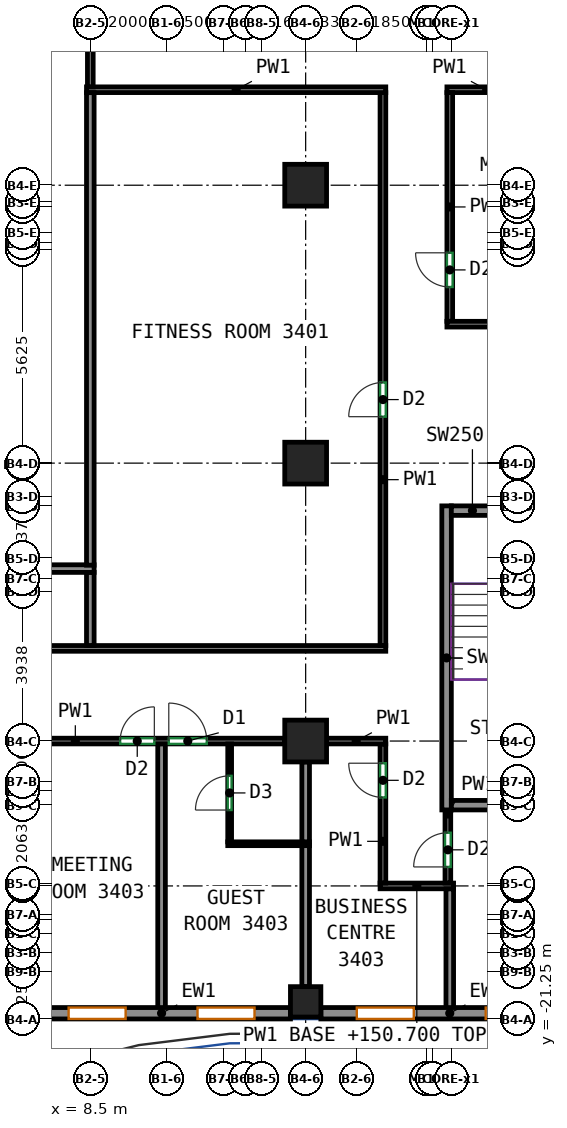
"""IFC4 building model, lengths in metres.
Left out: names, types, materials, properties, quantities, classifications, styles, units other than length and angle.
Written with IfcOpenShell. Run it as: python <this file> out.ifc"""

import sys

from ifc_helpers import new_model, si_unit, direction, frame, frame_2d, origin, origin_2d, place, context, subcontext, project, spatial, rectangle, extrude, source, transform, mapped, element, fill, save


model = new_model("IFC4")
c1 = context("Model", 3, precision=1e-05, world=origin(), true_north=direction((0.0, 1.0)))
c2 = subcontext(c1, "Body", "Model", "MODEL_VIEW")
j1 = project(units=[si_unit("LENGTHUNIT", "METRE"), si_unit("PLANEANGLEUNIT", "RADIAN")], contexts=[c1])
p1 = place(None, origin())
s1 = spatial("IfcSite", under=j1, at=p1, CompositionType="ELEMENT")
p2 = place(p1, origin())
s2 = spatial("IfcBuilding", under=s1, at=p2, CompositionType="ELEMENT")
p3 = place(p2, frame((0.0, 0.0, 150.7)))
s3 = spatial("IfcBuildingStorey", under=s2, at=p3, CompositionType="ELEMENT", Elevation=150.7)
m1 = source(origin(), c2, "Body", "SweptSolid", [
    extrude(rectangle(XDim=0.8, YDim=0.8, at=origin_2d()), origin(), (0.0, 0.0, 1.0), 3.12),
])
p4 = place(p3, frame((14.167, -20.8, 0.0), z_axis=(0.0, 0.0, 1.0), x_axis=(1.0, 0.0, 0.0)))
e1 = element("IfcColumn", 1, at=p4, inside=s3, PredefinedType="COLUMN", context=c2, shape_type="MappedRepresentation", body=[
    mapped(m1, transform((0.0, 0.0, 0.0))),
])
m2 = source(origin(), c2, "Body", "SweptSolid", [
    extrude(rectangle(XDim=1.1, YDim=1.1, at=origin_2d()), origin(), (0.0, 0.0, 1.0), 3.12),
])
for number, where, z_axis, x_axis in (
    (2, (14.167, -13.938, 0.0), (0.0, 0.0, 1.0), (1.0, 0.0, 0.0)),
    (3, (14.167, -6.625, 0.0), (0.0, 0.0, 1.0), (1.0, 0.0, 0.0)),
    (4, (14.167, 0.688, 0.0), (0.0, 0.0, 1.0), (1.0, 0.0, 0.0)),
):
    element("IfcColumn", number, at=place(p3, frame(where, z_axis=z_axis, x_axis=x_axis)), inside=s3, PredefinedType="COLUMN", context=c2, shape_type="MappedRepresentation", body=[
        mapped(m2, transform((0.0, 0.0, 0.0))),
    ])
m3 = source(origin(), c2, "Body", "SweptSolid", [
    extrude(rectangle(XDim=8.0, YDim=0.25, at=frame_2d((4.0, 0.0))), origin(), (0.0, 0.0, 1.0), 3.12),
])
p5 = place(p3, frame((17.875, -15.75, 0.0), z_axis=(0.0, 0.0, 1.0), x_axis=(0.0, 1.0, 0.0)))
e5 = element("IfcWall", 5, at=p5, inside=s3, PredefinedType="SHEAR", context=c2, shape_type="MappedRepresentation", body=[
    mapped(m3, transform((0.0, 0.0, 0.0))),
])
m4 = source(origin(), c2, "Body", "SweptSolid", [
    extrude(rectangle(XDim=3.7, YDim=0.25, at=frame_2d((1.85, 0.0))), origin(), (0.0, 0.0, 1.0), 3.12),
])
p6 = place(p3, frame((18.0, -15.625, 0.0), z_axis=(0.0, 0.0, 1.0), x_axis=(1.0, 0.0, 0.0)))
e6 = element("IfcWall", 6, at=p6, inside=s3, PredefinedType="SHEAR", context=c2, shape_type="MappedRepresentation", body=[
    mapped(m4, transform((0.0, 0.0, 0.0))),
])
p7 = place(p3, frame((18.0, -7.875, 0.0), z_axis=(0.0, 0.0, 1.0), x_axis=(1.0, 0.0, 0.0)))
e7 = element("IfcWall", 7, at=p7, inside=s3, PredefinedType="SHEAR", context=c2, shape_type="MappedRepresentation", body=[
    mapped(m4, transform((0.0, 0.0, 0.0))),
])
p8 = place(p7, frame((1.25, 0.0, 0.0)))
e8 = element("IfcOpeningElement", 8, at=p8, cuts=e7, PredefinedType="OPENING", context=c2, shape_type="SweptSolid", body=[
    extrude(rectangle(XDim=1.2, YDim=2.1, at=frame_2d((0.6, 1.05))), frame((0.0, 0.135, 0.0), z_axis=(0.0, -1.0, 0.0), x_axis=(1.0, 0.0, 0.0)), (0.0, 0.0, 1.0), 0.27),
])
m5 = source(origin(), c2, "Body", "SweptSolid", [
    extrude(rectangle(XDim=6.783, YDim=0.3, at=frame_2d((3.392, 0.0))), origin(), (0.0, 0.0, 1.0), 3.12),
])
p9 = place(p3, frame((6.983, -21.1, 0.0), z_axis=(0.0, 0.0, 1.0), x_axis=(1.0, 0.0, 0.0)))
e9 = element("IfcWall", 9, at=p9, inside=s3, PredefinedType="SOLIDWALL", context=c2, shape_type="MappedRepresentation", body=[
    mapped(m5, transform((0.0, 0.0, 0.0))),
])
p10 = place(p9, frame((0.946, 0.0, 0.85)))
e10 = element("IfcOpeningElement", 10, at=p10, cuts=e9, PredefinedType="OPENING", context=c2, shape_type="SweptSolid", body=[
    extrude(rectangle(XDim=1.5, YDim=1.95, at=frame_2d((0.75, 0.975))), frame((0.0, 0.16, 0.0), z_axis=(0.0, -1.0, 0.0), x_axis=(1.0, 0.0, 0.0)), (0.0, 0.0, 1.0), 0.32),
])
p11 = place(p9, frame((4.338, 0.0, 0.85)))
e11 = element("IfcOpeningElement", 11, at=p11, cuts=e9, PredefinedType="OPENING", context=c2, shape_type="SweptSolid", body=[
    extrude(rectangle(XDim=1.5, YDim=1.95, at=frame_2d((0.75, 0.975))), frame((0.0, 0.16, 0.0), z_axis=(0.0, -1.0, 0.0), x_axis=(1.0, 0.0, 0.0)), (0.0, 0.0, 1.0), 0.32),
])
m6 = source(origin(), c2, "Body", "SweptSolid", [
    extrude(rectangle(XDim=6.783, YDim=0.3, at=frame_2d((3.392, 0.0))), origin(), (0.0, 0.0, 1.0), 3.12),
])
p12 = place(p3, frame((14.567, -21.1, 0.0), z_axis=(0.0, 0.0, 1.0), x_axis=(1.0, 0.0, 0.0)))
e12 = element("IfcWall", 12, at=p12, inside=s3, PredefinedType="SOLIDWALL", context=c2, shape_type="MappedRepresentation", body=[
    mapped(m6, transform((0.0, 0.0, 0.0))),
])
p13 = place(p12, frame((0.946, 0.0, 0.85)))
e13 = element("IfcOpeningElement", 13, at=p13, cuts=e12, PredefinedType="OPENING", context=c2, shape_type="SweptSolid", body=[
    extrude(rectangle(XDim=1.5, YDim=1.95, at=frame_2d((0.75, 0.975))), frame((0.0, 0.16, 0.0), z_axis=(0.0, -1.0, 0.0), x_axis=(1.0, 0.0, 0.0)), (0.0, 0.0, 1.0), 0.32),
])
p14 = place(p12, frame((4.337, 0.0, 0.85)))
e14 = element("IfcOpeningElement", 14, at=p14, cuts=e12, PredefinedType="OPENING", context=c2, shape_type="SweptSolid", body=[
    extrude(rectangle(XDim=1.5, YDim=1.95, at=frame_2d((0.75, 0.975))), frame((0.0, 0.16, 0.0), z_axis=(0.0, -1.0, 0.0), x_axis=(1.0, 0.0, 0.0)), (0.0, 0.0, 1.0), 0.32),
])
p15 = place(p3, frame((7.133, -13.938, 0.0), z_axis=(0.0, 0.0, 1.0), x_axis=(1.0, 0.0, 0.0)))
e15 = element("IfcWall", 15, at=p15, inside=s3, PredefinedType="PARTITIONING", context=c2, shape_type="SweptSolid", body=[
    extrude(rectangle(XDim=6.484, YDim=0.15, at=frame_2d((3.242, 0.0))), origin(), (0.0, 0.0, 1.0), 3.12),
])
p16 = place(p15, frame((2.152, 0.0, 0.0)))
e16 = element("IfcOpeningElement", 16, at=p16, cuts=e15, PredefinedType="OPENING", context=c2, shape_type="SweptSolid", body=[
    extrude(rectangle(XDim=0.9, YDim=2.1, at=frame_2d((0.45, 1.05))), frame((0.0, 0.085, 0.0), z_axis=(0.0, -1.0, 0.0), x_axis=(1.0, 0.0, 0.0)), (0.0, 0.0, 1.0), 0.17),
])
p17 = place(p15, frame((3.432, 0.0, 0.0)))
e17 = element("IfcOpeningElement", 17, at=p17, cuts=e15, PredefinedType="OPENING", context=c2, shape_type="SweptSolid", body=[
    extrude(rectangle(XDim=1.0, YDim=2.1, at=frame_2d((0.5, 1.05))), frame((0.0, 0.085, 0.0), z_axis=(0.0, -1.0, 0.0), x_axis=(1.0, 0.0, 0.0)), (0.0, 0.0, 1.0), 0.17),
])
p18 = place(p3, frame((16.125, -17.75, 0.0), z_axis=(0.0, 0.0, 1.0), x_axis=(1.0, 0.0, 0.0)))
e18 = element("IfcWall", 18, at=p18, inside=s3, PredefinedType="PARTITIONING", context=c2, shape_type="SweptSolid", body=[
    extrude(rectangle(XDim=1.934, YDim=0.15, at=frame_2d((0.967, 0.0))), origin(), (0.0, 0.0, 1.0), 2.52),
])
p19 = place(p3, frame((16.2, -17.675, 0.0), z_axis=(0.0, 0.0, 1.0), x_axis=(0.0, 1.0, 0.0)))
e19 = element("IfcWall", 19, at=p19, inside=s3, PredefinedType="PARTITIONING", context=c2, shape_type="SweptSolid", body=[
    extrude(rectangle(XDim=3.662, YDim=0.15, at=frame_2d((1.831, 0.0))), origin(), (0.0, 0.0, 1.0), 3.12),
])
p20 = place(p19, frame((2.254, 0.0, 0.0)))
e20 = element("IfcOpeningElement", 20, at=p20, cuts=e19, PredefinedType="OPENING", context=c2, shape_type="SweptSolid", body=[
    extrude(rectangle(XDim=0.9, YDim=2.1, at=frame_2d((0.45, 1.05))), frame((0.0, 0.085, 0.0), z_axis=(0.0, -1.0, 0.0), x_axis=(1.0, 0.0, 0.0)), (0.0, 0.0, 1.0), 0.17),
])
p21 = place(p3, frame((14.717, -13.938, 0.0), z_axis=(0.0, 0.0, 1.0), x_axis=(1.0, 0.0, 0.0)))
e21 = element("IfcWall", 21, at=p21, inside=s3, PredefinedType="PARTITIONING", context=c2, shape_type="SweptSolid", body=[
    extrude(rectangle(XDim=1.558, YDim=0.15, at=frame_2d((0.779, 0.0))), origin(), (0.0, 0.0, 1.0), 3.12),
])
p22 = place(p3, frame((17.909, -17.675, 0.0), z_axis=(0.0, 0.0, 1.0), x_axis=(0.0, 1.0, 0.0)))
e22 = element("IfcWall", 22, at=p22, inside=s3, PredefinedType="PARTITIONING", context=c2, shape_type="SweptSolid", body=[
    extrude(rectangle(XDim=1.975, YDim=0.15, at=frame_2d((0.988, 0.0))), origin(), (0.0, 0.0, 1.0), 3.12),
])
p23 = place(p22, frame((0.425, 0.0, 0.0)))
e23 = element("IfcOpeningElement", 23, at=p23, cuts=e22, PredefinedType="OPENING", context=c2, shape_type="SweptSolid", body=[
    extrude(rectangle(XDim=0.9, YDim=2.1, at=frame_2d((0.45, 1.05))), frame((0.0, 0.085, 0.0), z_axis=(0.0, -1.0, 0.0), x_axis=(1.0, 0.0, 0.0)), (0.0, 0.0, 1.0), 0.17),
])
p24 = place(p3, frame((17.884, 3.2, 0.0), z_axis=(0.0, 0.0, 1.0), x_axis=(1.0, 0.0, 0.0)))
e24 = element("IfcWall", 24, at=p24, inside=s3, PredefinedType="PARTITIONING", context=c2, shape_type="SweptSolid", body=[
    extrude(rectangle(XDim=2.091, YDim=0.15, at=frame_2d((1.045, 0.0))), origin(), (0.0, 0.0, 1.0), 3.12),
])
p25 = place(p3, frame((17.959, -2.894, 0.0), z_axis=(0.0, 0.0, 1.0), x_axis=(0.0, 1.0, 0.0)))
e25 = element("IfcWall", 25, at=p25, inside=s3, PredefinedType="PARTITIONING", context=c2, shape_type="SweptSolid", body=[
    extrude(rectangle(XDim=6.019, YDim=0.15, at=frame_2d((3.01, 0.0))), origin(), (0.0, 0.0, 1.0), 3.12),
])
p26 = place(p25, frame((0.903, 0.0, 0.0)))
e26 = element("IfcOpeningElement", 26, at=p26, cuts=e25, PredefinedType="OPENING", context=c2, shape_type="SweptSolid", body=[
    extrude(rectangle(XDim=0.9, YDim=2.1, at=frame_2d((0.45, 1.05))), frame((0.0, 0.085, 0.0), z_axis=(0.0, -1.0, 0.0), x_axis=(1.0, 0.0, 0.0)), (0.0, 0.0, 1.0), 0.17),
])
p27 = place(p3, frame((21.751, -2.969, 0.0), z_axis=(0.0, 0.0, 1.0), x_axis=(-1.0, 0.0, 0.0)))
e27 = element("IfcWall", 27, at=p27, inside=s3, PredefinedType="PARTITIONING", context=c2, shape_type="SweptSolid", body=[
    extrude(rectangle(XDim=3.867, YDim=0.15, at=frame_2d((1.934, 0.0))), origin(), (0.0, 0.0, 1.0), 3.12),
])
p28 = place(p3, frame((-12.075, -11.5, 0.0), z_axis=(0.0, 0.0, 1.0), x_axis=(1.0, 0.0, 0.0)))
e28 = element("IfcWall", 28, at=p28, inside=s3, PredefinedType="PARTITIONING", context=c2, shape_type="SweptSolid", body=[
    extrude(rectangle(XDim=28.35, YDim=0.15, at=frame_2d((14.175, 0.0))), origin(), (0.0, 0.0, 1.0), 3.12),
])
p29 = place(p28, frame((11.273, 0.0, 0.0)))
e29 = element("IfcOpeningElement", 29, at=p29, cuts=e28, PredefinedType="OPENING", context=c2, shape_type="SweptSolid", body=[
    extrude(rectangle(XDim=0.9, YDim=2.1, at=frame_2d((0.45, 1.05))), frame((0.0, 0.085, 0.0), z_axis=(0.0, -1.0, 0.0), x_axis=(1.0, 0.0, 0.0)), (0.0, 0.0, 1.0), 0.17),
])
p30 = place(p3, frame((16.2, -11.425, 0.0), z_axis=(0.0, 0.0, 1.0), x_axis=(0.0, 1.0, 0.0)))
e30 = element("IfcWall", 30, at=p30, inside=s3, PredefinedType="PARTITIONING", context=c2, shape_type="SweptSolid", body=[
    extrude(rectangle(XDim=14.55, YDim=0.15, at=frame_2d((7.275, 0.0))), origin(), (0.0, 0.0, 1.0), 3.12),
])
p31 = place(p30, frame((6.022, 0.0, 0.0)))
e31 = element("IfcOpeningElement", 31, at=p31, cuts=e30, PredefinedType="OPENING", context=c2, shape_type="SweptSolid", body=[
    extrude(rectangle(XDim=0.9, YDim=2.1, at=frame_2d((0.45, 1.05))), frame((0.0, 0.085, 0.0), z_axis=(0.0, -1.0, 0.0), x_axis=(1.0, 0.0, 0.0)), (0.0, 0.0, 1.0), 0.17),
])
p32 = place(p3, frame((8.4, 3.2, 0.0), z_axis=(0.0, 0.0, 1.0), x_axis=(1.0, 0.0, 0.0)))
e32 = element("IfcWall", 32, at=p32, inside=s3, PredefinedType="PARTITIONING", context=c2, shape_type="SweptSolid", body=[
    extrude(rectangle(XDim=7.875, YDim=0.15, at=frame_2d((3.938, 0.0))), origin(), (0.0, 0.0, 1.0), 3.12),
])
p33 = place(p3, frame((8.5, 5.525, 0.0), z_axis=(0.0, 0.0, 1.0), x_axis=(0.0, -1.0, 0.0)))
e33 = element("IfcWall", 33, at=p33, inside=s3, PredefinedType="PARTITIONING", context=c2, shape_type="SweptSolid", body=[
    extrude(rectangle(XDim=2.25, YDim=0.15, at=frame_2d((1.125, 0.0))), origin(), (0.0, 0.0, 1.0), 3.12),
])
p34 = place(p3, frame((10.375, -21.0, 0.0), z_axis=(0.0, 0.0, 1.0), x_axis=(0.0, 1.0, 0.0)))
e34 = element("IfcWall", 34, at=p34, inside=s3, PredefinedType="PARTITIONING", context=c2, shape_type="SweptSolid", body=[
    extrude(rectangle(XDim=6.985, YDim=0.2, at=frame_2d((3.493, 0.0))), origin(), (0.0, 0.0, 1.0), 3.12),
])
p35 = place(p3, frame((12.167, -16.59, 0.0), z_axis=(0.0, 0.0, 1.0), x_axis=(0.0, 1.0, 0.0)))
e35 = element("IfcWall", 35, at=p35, inside=s3, PredefinedType="PARTITIONING", context=c2, shape_type="SweptSolid", body=[
    extrude(rectangle(XDim=2.575, YDim=0.1, at=frame_2d((1.288, 0.0))), origin(), (0.0, 0.0, 1.0), 3.12),
])
p36 = place(p35, frame((0.837, 0.0, 0.0)))
e36 = element("IfcOpeningElement", 36, at=p36, cuts=e35, PredefinedType="OPENING", context=c2, shape_type="SweptSolid", body=[
    extrude(rectangle(XDim=0.9, YDim=2.1, at=frame_2d((0.45, 1.05))), frame((0.0, 0.06, 0.0), z_axis=(0.0, -1.0, 0.0), x_axis=(1.0, 0.0, 0.0)), (0.0, 0.0, 1.0), 0.12),
])
p37 = place(p3, frame((12.117, -16.64, 0.0), z_axis=(0.0, 0.0, 1.0), x_axis=(1.0, 0.0, 0.0)))
e37 = element("IfcWall", 37, at=p37, inside=s3, PredefinedType="PARTITIONING", context=c2, shape_type="SweptSolid", body=[
    extrude(rectangle(XDim=2.15, YDim=0.1, at=frame_2d((1.075, 0.0))), origin(), (0.0, 0.0, 1.0), 3.12),
])
p38 = place(p3, frame((14.167, -20.4, 0.0), z_axis=(0.0, 0.0, 1.0), x_axis=(0.0, 1.0, 0.0)))
e38 = element("IfcWall", 38, at=p38, inside=s3, PredefinedType="PARTITIONING", context=c2, shape_type="SweptSolid", body=[
    extrude(rectangle(XDim=3.71, YDim=0.2, at=frame_2d((1.855, 0.0))), origin(), (0.0, 0.0, 1.0), 3.12),
])
p39 = place(p3, frame((14.167, -16.59, 0.0), z_axis=(0.0, 0.0, 1.0), x_axis=(0.0, 1.0, 0.0)))
e39 = element("IfcWall", 39, at=p39, inside=s3, PredefinedType="PARTITIONING", context=c2, shape_type="SweptSolid", body=[
    extrude(rectangle(XDim=2.102, YDim=0.2, at=frame_2d((1.051, 0.0))), origin(), (0.0, 0.0, 1.0), 3.12),
])
p40 = place(p3, frame((17.959, -21.0, 0.0), z_axis=(0.0, 0.0, 1.0), x_axis=(0.0, 1.0, 0.0)))
e40 = element("IfcWall", 40, at=p40, inside=s3, PredefinedType="PARTITIONING", context=c2, shape_type="SweptSolid", body=[
    extrude(rectangle(XDim=3.173, YDim=0.2, at=frame_2d((1.586, 0.0))), origin(), (0.0, 0.0, 1.0), 3.12),
])
p41 = place(p3, frame((8.5, -11.423, 0.0), z_axis=(0.0, 0.0, 1.0), x_axis=(0.0, 1.0, 0.0)))
e41 = element("IfcWall", 41, at=p41, inside=s3, PredefinedType="PARTITIONING", context=c2, shape_type="SweptSolid", body=[
    extrude(rectangle(XDim=1.923, YDim=0.2, at=frame_2d((0.961, 0.0))), origin(), (0.0, 0.0, 1.0), 3.12),
])
p42 = place(p3, frame((8.6, -9.4, 0.0), z_axis=(0.0, 0.0, 1.0), x_axis=(-1.0, 0.0, 0.0)))
e42 = element("IfcWall", 42, at=p42, inside=s3, PredefinedType="PARTITIONING", context=c2, shape_type="SweptSolid", body=[
    extrude(rectangle(XDim=15.2, YDim=0.2, at=frame_2d((7.6, 0.0))), origin(), (0.0, 0.0, 1.0), 3.12),
])
p43 = place(p3, frame((8.5, -9.31, 0.0), z_axis=(0.0, 0.0, 1.0), x_axis=(0.0, 1.0, 0.0)))
e43 = element("IfcWall", 43, at=p43, inside=s3, PredefinedType="PARTITIONING", context=c2, shape_type="SweptSolid", body=[
    extrude(rectangle(XDim=12.433, YDim=0.2, at=frame_2d((6.217, 0.0))), origin(), (0.0, 0.0, 1.0), 3.12),
])
p44 = place(p10, origin())
e44 = element("IfcWindow", 44, at=p44, inside=s3, PartitioningType="SINGLE_PANEL", PredefinedType="WINDOW", context=c2, shape_type="SweptSolid", body=[
    extrude(rectangle(XDim=1.5, YDim=1.95, at=frame_2d((0.75, 0.975))), frame((0.0, 0.03, 0.0), z_axis=(0.0, -1.0, 0.0), x_axis=(1.0, 0.0, 0.0)), (0.0, 0.0, 1.0), 0.06),
])
fill(e10, e44)
p45 = place(p11, origin())
e45 = element("IfcWindow", 45, at=p45, inside=s3, PartitioningType="SINGLE_PANEL", PredefinedType="WINDOW", context=c2, shape_type="SweptSolid", body=[
    extrude(rectangle(XDim=1.5, YDim=1.95, at=frame_2d((0.75, 0.975))), frame((0.0, 0.03, 0.0), z_axis=(0.0, -1.0, 0.0), x_axis=(1.0, 0.0, 0.0)), (0.0, 0.0, 1.0), 0.06),
])
fill(e11, e45)
p46 = place(p13, origin())
e46 = element("IfcWindow", 46, at=p46, inside=s3, PartitioningType="SINGLE_PANEL", PredefinedType="WINDOW", context=c2, shape_type="SweptSolid", body=[
    extrude(rectangle(XDim=1.5, YDim=1.95, at=frame_2d((0.75, 0.975))), frame((0.0, 0.03, 0.0), z_axis=(0.0, -1.0, 0.0), x_axis=(1.0, 0.0, 0.0)), (0.0, 0.0, 1.0), 0.06),
])
fill(e13, e46)
p47 = place(p14, origin())
e47 = element("IfcWindow", 47, at=p47, inside=s3, PartitioningType="SINGLE_PANEL", PredefinedType="WINDOW", context=c2, shape_type="SweptSolid", body=[
    extrude(rectangle(XDim=1.5, YDim=1.95, at=frame_2d((0.75, 0.975))), frame((0.0, 0.03, 0.0), z_axis=(0.0, -1.0, 0.0), x_axis=(1.0, 0.0, 0.0)), (0.0, 0.0, 1.0), 0.06),
])
fill(e14, e47)
p48 = place(p23, origin())
e48 = element("IfcDoor", 48, at=p48, inside=s3, OperationType="SINGLE_SWING_LEFT", PredefinedType="DOOR", context=c2, shape_type="SweptSolid", body=[
    extrude(rectangle(XDim=0.9, YDim=2.1, at=frame_2d((0.45, 1.05))), frame((0.0, 0.025, 0.0), z_axis=(0.0, -1.0, 0.0), x_axis=(1.0, 0.0, 0.0)), (0.0, 0.0, 1.0), 0.05),
])
fill(e23, e48)
p49 = place(p36, origin())
e49 = element("IfcDoor", 49, at=p49, inside=s3, OperationType="SINGLE_SWING_LEFT", PredefinedType="DOOR", context=c2, shape_type="SweptSolid", body=[
    extrude(rectangle(XDim=0.9, YDim=2.1, at=frame_2d((0.45, 1.05))), frame((0.0, 0.025, 0.0), z_axis=(0.0, -1.0, 0.0), x_axis=(1.0, 0.0, 0.0)), (0.0, 0.0, 1.0), 0.05),
])
fill(e36, e49)
p50 = place(p20, origin())
e50 = element("IfcDoor", 50, at=p50, inside=s3, OperationType="SINGLE_SWING_RIGHT", PredefinedType="DOOR", context=c2, shape_type="SweptSolid", body=[
    extrude(rectangle(XDim=0.9, YDim=2.1, at=frame_2d((0.45, 1.05))), frame((0.0, 0.025, 0.0), z_axis=(0.0, -1.0, 0.0), x_axis=(1.0, 0.0, 0.0)), (0.0, 0.0, 1.0), 0.05),
])
fill(e20, e50)
p51 = place(p16, origin())
e51 = element("IfcDoor", 51, at=p51, inside=s3, OperationType="SINGLE_SWING_RIGHT", PredefinedType="DOOR", context=c2, shape_type="SweptSolid", body=[
    extrude(rectangle(XDim=0.9, YDim=2.1, at=frame_2d((0.45, 1.05))), frame((0.0, 0.025, 0.0), z_axis=(0.0, -1.0, 0.0), x_axis=(1.0, 0.0, 0.0)), (0.0, 0.0, 1.0), 0.05),
])
fill(e16, e51)
p52 = place(p17, origin())
e52 = element("IfcDoor", 52, at=p52, inside=s3, OperationType="SINGLE_SWING_LEFT", PredefinedType="DOOR", context=c2, shape_type="SweptSolid", body=[
    extrude(rectangle(XDim=1.0, YDim=2.1, at=frame_2d((0.5, 1.05))), frame((0.0, 0.025, 0.0), z_axis=(0.0, -1.0, 0.0), x_axis=(1.0, 0.0, 0.0)), (0.0, 0.0, 1.0), 0.05),
])
fill(e17, e52)
p53 = place(p31, origin())
e53 = element("IfcDoor", 53, at=p53, inside=s3, OperationType="SINGLE_SWING_LEFT", PredefinedType="DOOR", context=c2, shape_type="SweptSolid", body=[
    extrude(rectangle(XDim=0.9, YDim=2.1, at=frame_2d((0.45, 1.05))), frame((0.0, 0.025, 0.0), z_axis=(0.0, -1.0, 0.0), x_axis=(1.0, 0.0, 0.0)), (0.0, 0.0, 1.0), 0.05),
])
fill(e31, e53)
p54 = place(p26, origin())
e54 = element("IfcDoor", 54, at=p54, inside=s3, OperationType="SINGLE_SWING_RIGHT", PredefinedType="DOOR", context=c2, shape_type="SweptSolid", body=[
    extrude(rectangle(XDim=0.9, YDim=2.1, at=frame_2d((0.45, 1.05))), frame((0.0, 0.025, 0.0), z_axis=(0.0, -1.0, 0.0), x_axis=(1.0, 0.0, 0.0)), (0.0, 0.0, 1.0), 0.05),
])
fill(e26, e54)
save(model, sys.argv[1])
